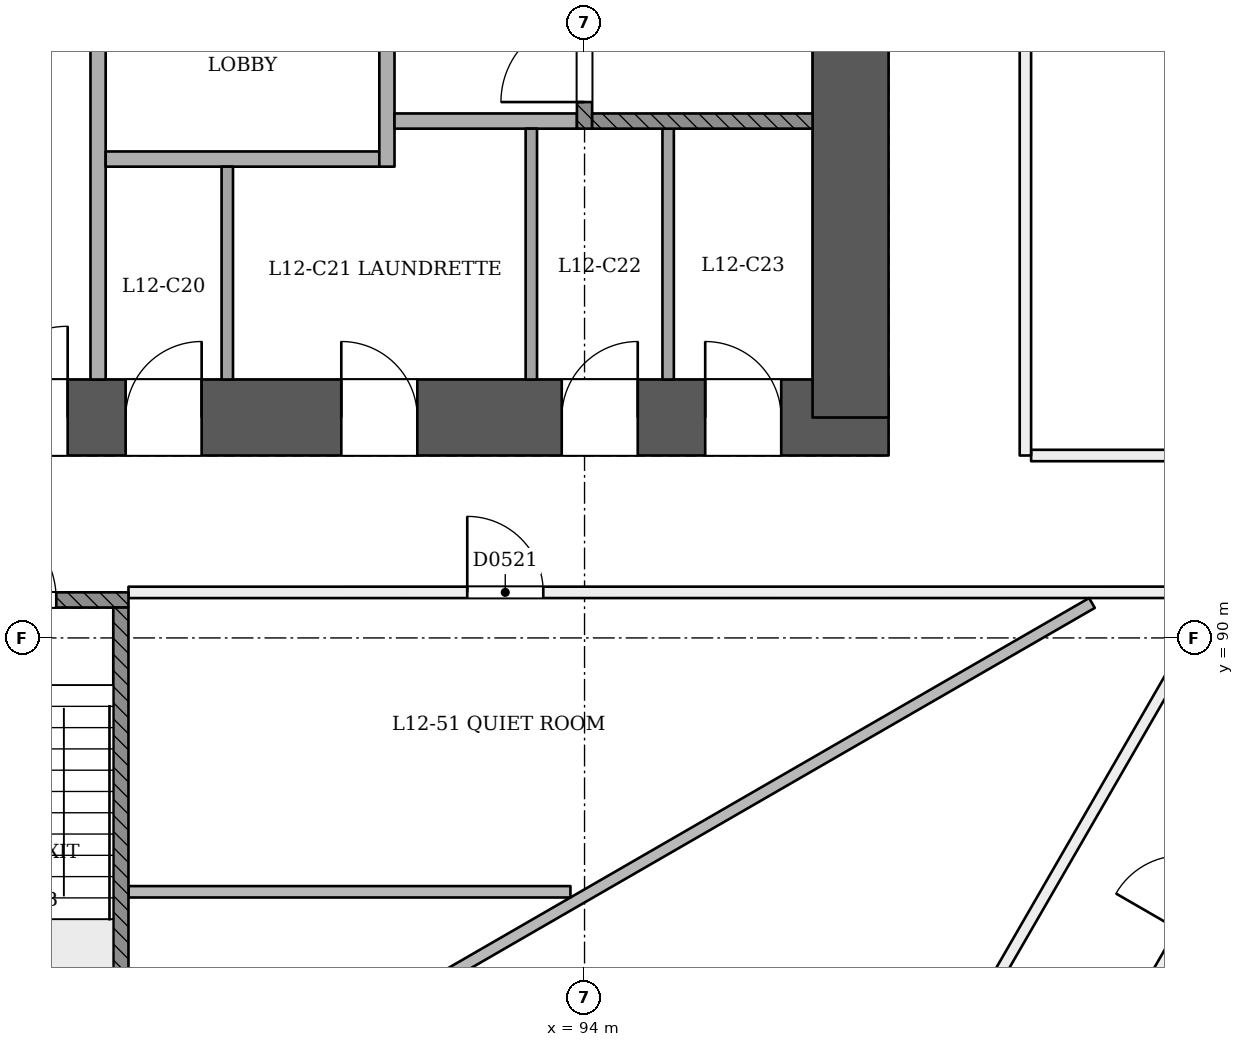
"""IFC4 building model, lengths in metres.
Left out: names, types, materials, properties, quantities, classifications, styles, units other than length and angle.
Written with IfcOpenShell. Run it as: python <this file> out.ifc"""

import sys

from ifc_helpers import new_model, si_unit, direction, frame, frame_2d, origin, place, context, subcontext, project, spatial, rectangle, extrude, element, fill, save


model = new_model("IFC4")
c1 = context("Model", 3, precision=1e-05, world=origin(), true_north=direction((0.0, 1.0)))
c2 = subcontext(c1, "Body", "Model", "MODEL_VIEW")
j1 = project(units=[si_unit("LENGTHUNIT", "METRE"), si_unit("PLANEANGLEUNIT", "RADIAN")], contexts=[c1])
p1 = place(None, origin())
s1 = spatial("IfcSite", under=j1, at=p1, CompositionType="ELEMENT")
p2 = place(p1, origin())
s2 = spatial("IfcBuilding", under=s1, at=p2, CompositionType="ELEMENT")
p3 = place(p2, frame((0.0, 0.0, 52.2)))
s3 = spatial("IfcBuildingStorey", under=s2, at=p3, CompositionType="ELEMENT", Elevation=52.2)
p4 = place(p3, frame((72.5, 92.9, 0.0), z_axis=(0.0, 0.0, 1.0), x_axis=(1.0, 0.0, 0.0)))
e1 = element("IfcWall", 1, at=p4, inside=s3, PredefinedType="SHEAR", context=c2, shape_type="SweptSolid", body=[
    extrude(rectangle(XDim=25.5, YDim=1.0, at=frame_2d((12.75, 0.0))), origin(), (0.0, 0.0, 1.0), 3.6),
])
p5 = place(p4, frame((1.3, 0.0, 0.0)))
e2 = element("IfcOpeningElement", 2, at=p5, cuts=e1, PredefinedType="OPENING", context=c2, shape_type="SweptSolid", body=[
    extrude(rectangle(XDim=1.2, YDim=2.1, at=frame_2d((0.6, 1.05))), frame((0.0, 0.51, 0.0), z_axis=(0.0, -1.0, 0.0), x_axis=(1.0, 0.0, 0.0)), (0.0, 0.0, 1.0), 1.021),
])
p6 = place(p4, frame((3.5, 0.0, 0.0)))
e3 = element("IfcOpeningElement", 3, at=p6, cuts=e1, PredefinedType="OPENING", context=c2, shape_type="SweptSolid", body=[
    extrude(rectangle(XDim=1.2, YDim=2.1, at=frame_2d((0.6, 1.05))), frame((0.0, 0.51, 0.0), z_axis=(0.0, -1.0, 0.0), x_axis=(1.0, 0.0, 0.0)), (0.0, 0.0, 1.0), 1.021),
])
p7 = place(p4, frame((13.5, 0.0, 0.0)))
e4 = element("IfcOpeningElement", 4, at=p7, cuts=e1, PredefinedType="OPENING", context=c2, shape_type="SweptSolid", body=[
    extrude(rectangle(XDim=1.2, YDim=2.1, at=frame_2d((0.6, 1.05))), frame((0.0, 0.51, 0.0), z_axis=(0.0, -1.0, 0.0), x_axis=(1.0, 0.0, 0.0)), (0.0, 0.0, 1.0), 1.021),
])
p8 = place(p4, frame((15.462, 0.0, 0.0)))
e5 = element("IfcOpeningElement", 5, at=p8, cuts=e1, PredefinedType="OPENING", context=c2, shape_type="SweptSolid", body=[
    extrude(rectangle(XDim=1.0, YDim=2.1, at=frame_2d((0.5, 1.05))), frame((0.0, 0.51, 0.0), z_axis=(0.0, -1.0, 0.0), x_axis=(1.0, 0.0, 0.0)), (0.0, 0.0, 1.0), 1.021),
])
p9 = place(p4, frame((18.3, 0.0, 0.0)))
e6 = element("IfcOpeningElement", 6, at=p9, cuts=e1, PredefinedType="OPENING", context=c2, shape_type="SweptSolid", body=[
    extrude(rectangle(XDim=1.0, YDim=2.1, at=frame_2d((0.5, 1.05))), frame((0.0, 0.51, 0.0), z_axis=(0.0, -1.0, 0.0), x_axis=(1.0, 0.0, 0.0)), (0.0, 0.0, 1.0), 1.021),
])
p10 = place(p4, frame((21.2, 0.0, 0.0)))
e7 = element("IfcOpeningElement", 7, at=p10, cuts=e1, PredefinedType="OPENING", context=c2, shape_type="SweptSolid", body=[
    extrude(rectangle(XDim=1.0, YDim=2.1, at=frame_2d((0.5, 1.05))), frame((0.0, 0.51, 0.0), z_axis=(0.0, -1.0, 0.0), x_axis=(1.0, 0.0, 0.0)), (0.0, 0.0, 1.0), 1.021),
])
p11 = place(p4, frame((23.087, 0.0, 0.0)))
e8 = element("IfcOpeningElement", 8, at=p11, cuts=e1, PredefinedType="OPENING", context=c2, shape_type="SweptSolid", body=[
    extrude(rectangle(XDim=1.0, YDim=2.1, at=frame_2d((0.5, 1.05))), frame((0.0, 0.51, 0.0), z_axis=(0.0, -1.0, 0.0), x_axis=(1.0, 0.0, 0.0)), (0.0, 0.0, 1.0), 1.021),
])
p12 = place(p3, frame((97.5, 92.9, 0.0), z_axis=(0.0, 0.0, 1.0), x_axis=(0.0, 1.0, 0.0)))
e9 = element("IfcWall", 9, at=p12, inside=s3, PredefinedType="SHEAR", context=c2, shape_type="SweptSolid", body=[
    extrude(rectangle(XDim=11.5, YDim=1.0, at=frame_2d((5.75, 0.0))), origin(), (0.0, 0.0, 1.0), 3.6),
])
p13 = place(p3, frame((86.05, 58.757, 0.0), z_axis=(0.0, 0.0, 1.0), x_axis=(0.499999296855, 0.866025809745, 0.0)))
e10 = element("IfcWall", 10, at=p13, inside=s3, PredefinedType="PARTITIONING", context=c2, shape_type="SweptSolid", body=[
    extrude(rectangle(XDim=43.792, YDim=0.15, at=frame_2d((21.896, 0.0))), origin(), (0.0, 0.0, 1.0), 2.7),
])
p14 = place(p13, frame((3.598, 0.0, 0.0)))
e11 = element("IfcOpeningElement", 11, at=p14, cuts=e10, PredefinedType="OPENING", context=c2, shape_type="SweptSolid", body=[
    extrude(rectangle(XDim=1.2, YDim=2.1, at=frame_2d((0.6, 1.05))), frame((0.0, 0.085, 0.0), z_axis=(0.0, -1.0, 0.0), x_axis=(1.0, 0.0, 0.0)), (0.0, 0.0, 1.0), 0.171),
])
p15 = place(p13, frame((11.176, 0.0, 0.0)))
e12 = element("IfcOpeningElement", 12, at=p15, cuts=e10, PredefinedType="OPENING", context=c2, shape_type="SweptSolid", body=[
    extrude(rectangle(XDim=1.0, YDim=2.1, at=frame_2d((0.5, 1.05))), frame((0.0, 0.085, 0.0), z_axis=(0.0, -1.0, 0.0), x_axis=(1.0, 0.0, 0.0)), (0.0, 0.0, 1.0), 0.171),
])
p16 = place(p13, frame((13.616, 0.0, 0.0)))
e13 = element("IfcOpeningElement", 13, at=p16, cuts=e10, PredefinedType="OPENING", context=c2, shape_type="SweptSolid", body=[
    extrude(rectangle(XDim=1.0, YDim=2.1, at=frame_2d((0.5, 1.05))), frame((0.0, 0.085, 0.0), z_axis=(0.0, -1.0, 0.0), x_axis=(1.0, 0.0, 0.0)), (0.0, 0.0, 1.0), 0.171),
])
p17 = place(p13, frame((20.176, 0.0, 0.0)))
e14 = element("IfcOpeningElement", 14, at=p17, cuts=e10, PredefinedType="OPENING", context=c2, shape_type="SweptSolid", body=[
    extrude(rectangle(XDim=1.0, YDim=2.1, at=frame_2d((0.5, 1.05))), frame((0.0, 0.085, 0.0), z_axis=(0.0, -1.0, 0.0), x_axis=(1.0, 0.0, 0.0)), (0.0, 0.0, 1.0), 0.171),
])
p18 = place(p13, frame((22.616, 0.0, 0.0)))
e15 = element("IfcOpeningElement", 15, at=p18, cuts=e10, PredefinedType="OPENING", context=c2, shape_type="SweptSolid", body=[
    extrude(rectangle(XDim=1.0, YDim=2.1, at=frame_2d((0.5, 1.05))), frame((0.0, 0.085, 0.0), z_axis=(0.0, -1.0, 0.0), x_axis=(1.0, 0.0, 0.0)), (0.0, 0.0, 1.0), 0.171),
])
p19 = place(p13, frame((29.176, 0.0, 0.0)))
e16 = element("IfcOpeningElement", 16, at=p19, cuts=e10, PredefinedType="OPENING", context=c2, shape_type="SweptSolid", body=[
    extrude(rectangle(XDim=1.0, YDim=2.1, at=frame_2d((0.5, 1.05))), frame((0.0, 0.085, 0.0), z_axis=(0.0, -1.0, 0.0), x_axis=(1.0, 0.0, 0.0)), (0.0, 0.0, 1.0), 0.171),
])
p20 = place(p13, frame((31.616, 0.0, 0.0)))
e17 = element("IfcOpeningElement", 17, at=p20, cuts=e10, PredefinedType="OPENING", context=c2, shape_type="SweptSolid", body=[
    extrude(rectangle(XDim=1.0, YDim=2.1, at=frame_2d((0.5, 1.05))), frame((0.0, 0.085, 0.0), z_axis=(0.0, -1.0, 0.0), x_axis=(1.0, 0.0, 0.0)), (0.0, 0.0, 1.0), 0.171),
])
p21 = place(p13, frame((38.176, 0.0, 0.0)))
e18 = element("IfcOpeningElement", 18, at=p21, cuts=e10, PredefinedType="OPENING", context=c2, shape_type="SweptSolid", body=[
    extrude(rectangle(XDim=1.0, YDim=2.1, at=frame_2d((0.5, 1.05))), frame((0.0, 0.085, 0.0), z_axis=(0.0, -1.0, 0.0), x_axis=(1.0, 0.0, 0.0)), (0.0, 0.0, 1.0), 0.171),
])
p22 = place(p13, frame((41.344, 0.0, 0.0)))
e19 = element("IfcOpeningElement", 19, at=p22, cuts=e10, PredefinedType="OPENING", context=c2, shape_type="SweptSolid", body=[
    extrude(rectangle(XDim=1.0, YDim=2.1, at=frame_2d((0.5, 1.05))), frame((0.0, 0.085, 0.0), z_axis=(0.0, -1.0, 0.0), x_axis=(1.0, 0.0, 0.0)), (0.0, 0.0, 1.0), 0.171),
])
p23 = place(p3, frame((103.395, 92.4, 0.0), z_axis=(0.0, 0.0, 1.0), x_axis=(-1.0, 0.0, 0.0)))
e20 = element("IfcWall", 20, at=p23, inside=s3, PredefinedType="PARTITIONING", context=c2, shape_type="SweptSolid", body=[
    extrude(rectangle(XDim=3.52, YDim=0.15, at=frame_2d((1.76, 0.0))), origin(), (0.0, 0.0, 1.0), 3.1),
])
p24 = place(p3, frame((99.8, 92.4, 0.0), z_axis=(0.0, 0.0, 1.0), x_axis=(0.0, 1.0, 0.0)))
e21 = element("IfcWall", 21, at=p24, inside=s3, PredefinedType="PARTITIONING", context=c2, shape_type="SweptSolid", body=[
    extrude(rectangle(XDim=11.5, YDim=0.15, at=frame_2d((5.75, 0.0))), origin(), (0.0, 0.0, 1.0), 2.6),
])
p25 = place(p24, frame((6.929, 0.0, 0.0)))
e22 = element("IfcOpeningElement", 22, at=p25, cuts=e21, PredefinedType="OPENING", context=c2, shape_type="SweptSolid", body=[
    extrude(rectangle(XDim=1.2, YDim=2.1, at=frame_2d((0.6, 1.05))), frame((0.0, 0.085, 0.0), z_axis=(0.0, -1.0, 0.0), x_axis=(1.0, 0.0, 0.0)), (0.0, 0.0, 1.0), 0.171),
])
p26 = place(p3, frame((102.355, 90.6, 0.0), z_axis=(0.0, 0.0, 1.0), x_axis=(-0.500000924128, -0.866024870238, 0.0)))
e23 = element("IfcWall", 23, at=p26, inside=s3, PredefinedType="PARTITIONING", context=c2, shape_type="SweptSolid", body=[
    extrude(rectangle(XDim=34.581, YDim=0.15, at=frame_2d((17.291, 0.0))), origin(), (0.0, 0.0, 1.0), 3.1),
])
p27 = place(p26, frame((9.118, 0.0, 0.0)))
e24 = element("IfcOpeningElement", 24, at=p27, cuts=e23, PredefinedType="OPENING", context=c2, shape_type="SweptSolid", body=[
    extrude(rectangle(XDim=1.2, YDim=2.1, at=frame_2d((0.6, 1.05))), frame((0.0, 0.085, 0.0), z_axis=(0.0, -1.0, 0.0), x_axis=(1.0, 0.0, 0.0)), (0.0, 0.0, 1.0), 0.171),
])
p28 = place(p3, frame((88.0, 90.599, 0.0), z_axis=(0.0, 0.0, 1.0), x_axis=(0.999999997644, 6.8649493e-05, 0.0)))
e25 = element("IfcWall", 25, at=p28, inside=s3, PredefinedType="PARTITIONING", context=c2, shape_type="SweptSolid", body=[
    extrude(rectangle(XDim=14.225, YDim=0.15, at=frame_2d((7.113, 0.0))), origin(), (0.0, 0.0, 1.0), 3.1),
])
p29 = place(p28, frame((4.457, 0.0, 0.0)))
e26 = element("IfcOpeningElement", 26, at=p29, cuts=e25, PredefinedType="OPENING", context=c2, shape_type="SweptSolid", body=[
    extrude(rectangle(XDim=1.0, YDim=2.1, at=frame_2d((0.5, 1.05))), frame((0.0, 0.085, 0.0), z_axis=(0.0, -1.0, 0.0), x_axis=(1.0, 0.0, 0.0)), (0.0, 0.0, 1.0), 0.171),
])
p30 = place(p3, frame((100.676, 90.46, 0.0), z_axis=(0.0, 0.0, 1.0), x_axis=(-0.866019571687, -0.500010101354, 0.0)))
e27 = element("IfcWall", 27, at=p30, inside=s3, PredefinedType="PARTITIONING", context=c2, shape_type="SweptSolid", body=[
    extrude(rectangle(XDim=13.641, YDim=0.15, at=frame_2d((6.82, 0.0))), origin(), (0.0, 0.0, 1.0), 3.1),
])
p31 = place(p3, frame((93.814, 86.66, 0.0), z_axis=(0.0, 0.0, 1.0), x_axis=(-1.0, 0.0, 0.0)))
e28 = element("IfcWall", 28, at=p31, inside=s3, PredefinedType="PARTITIONING", context=c2, shape_type="SweptSolid", body=[
    extrude(rectangle(XDim=5.814, YDim=0.15, at=frame_2d((2.907, 0.0))), origin(), (0.0, 0.0, 1.0), 3.1),
])
p32 = place(p3, frame((87.6, 93.4, 0.0), z_axis=(0.0, 0.0, 1.0), x_axis=(0.0, 1.0, 0.0)))
e29 = element("IfcWall", 29, at=p32, inside=s3, PredefinedType="PARTITIONING", context=c2, shape_type="SweptSolid", body=[
    extrude(rectangle(XDim=7.0, YDim=0.2, at=frame_2d((3.5, 0.0))), origin(), (0.0, 0.0, 1.0), 3.1),
])
p33 = place(p32, frame((4.45, 0.0, 0.0)))
e30 = element("IfcOpeningElement", 30, at=p33, cuts=e29, PredefinedType="OPENING", context=c2, shape_type="SweptSolid", body=[
    extrude(rectangle(XDim=1.1, YDim=2.1, at=frame_2d((0.55, 1.05))), frame((0.0, 0.11, 0.0), z_axis=(0.0, -1.0, 0.0), x_axis=(1.0, 0.0, 0.0)), (0.0, 0.0, 1.0), 0.221),
])
p34 = place(p3, frame((89.3, 93.4, 0.0), z_axis=(0.0, 0.0, 1.0), x_axis=(0.0, 1.0, 0.0)))
e31 = element("IfcWall", 31, at=p34, inside=s3, PredefinedType="PARTITIONING", context=c2, shape_type="SweptSolid", body=[
    extrude(rectangle(XDim=2.8, YDim=0.15, at=frame_2d((1.4, 0.0))), origin(), (0.0, 0.0, 1.0), 3.1),
])
for number, where, z_axis, x_axis in (
    (32, (93.3, 93.4, 0.0), (0.0, 0.0, 1.0), (0.0, 1.0, 0.0)),
    (33, (95.1, 93.4, 0.0), (0.0, 0.0, 1.0), (0.0, 1.0, 0.0)),
):
    element("IfcWall", number, at=place(p3, frame(where, z_axis=z_axis, x_axis=x_axis)), inside=s3, PredefinedType="PARTITIONING", context=c2, shape_type="SweptSolid", body=[
        extrude(rectangle(XDim=3.3, YDim=0.15, at=frame_2d((1.65, 0.0))), origin(), (0.0, 0.0, 1.0), 3.1),
    ])
p35 = place(p3, frame((87.7, 96.3, 0.0), z_axis=(0.0, 0.0, 1.0), x_axis=(1.0, 0.0, 0.0)))
e34 = element("IfcWall", 34, at=p35, inside=s3, PredefinedType="PARTITIONING", context=c2, shape_type="SweptSolid", body=[
    extrude(rectangle(XDim=3.6, YDim=0.2, at=frame_2d((1.8, 0.0))), origin(), (0.0, 0.0, 1.0), 3.1),
])
p36 = place(p3, frame((91.4, 96.2, 0.0), z_axis=(0.0, 0.0, 1.0), x_axis=(0.0, 1.0, 0.0)))
e35 = element("IfcWall", 35, at=p36, inside=s3, PredefinedType="PARTITIONING", context=c2, shape_type="SweptSolid", body=[
    extrude(rectangle(XDim=4.2, YDim=0.2, at=frame_2d((2.1, 0.0))), origin(), (0.0, 0.0, 1.0), 3.1),
])
p37 = place(p36, frame((2.45, 0.0, 0.0)))
e36 = element("IfcOpeningElement", 36, at=p37, cuts=e35, PredefinedType="OPENING", context=c2, shape_type="SweptSolid", body=[
    extrude(rectangle(XDim=1.1, YDim=2.1, at=frame_2d((0.55, 1.05))), frame((0.0, 0.11, 0.0), z_axis=(0.0, -1.0, 0.0), x_axis=(1.0, 0.0, 0.0)), (0.0, 0.0, 1.0), 0.221),
])
p38 = place(p3, frame((91.5, 96.8, 0.0), z_axis=(0.0, 0.0, 1.0), x_axis=(1.0, 0.0, 0.0)))
e37 = element("IfcWall", 37, at=p38, inside=s3, PredefinedType="PARTITIONING", context=c2, shape_type="SweptSolid", body=[
    extrude(rectangle(XDim=2.4, YDim=0.2, at=frame_2d((1.2, 0.0))), origin(), (0.0, 0.0, 1.0), 3.1),
])
p39 = place(p3, frame((94.0, 96.7, 0.0), z_axis=(0.0, 0.0, 1.0), x_axis=(0.0, 1.0, 0.0)))
e38 = element("IfcWall", 38, at=p39, inside=s3, PredefinedType="SOLIDWALL", context=c2, shape_type="SweptSolid", body=[
    extrude(rectangle(XDim=3.7, YDim=0.2, at=frame_2d((1.85, 0.0))), origin(), (0.0, 0.0, 1.0), 3.1),
])
p40 = place(p39, frame((0.35, 0.0, 0.0)))
e39 = element("IfcOpeningElement", 39, at=p40, cuts=e38, PredefinedType="OPENING", context=c2, shape_type="SweptSolid", body=[
    extrude(rectangle(XDim=1.1, YDim=2.1, at=frame_2d((0.55, 1.05))), frame((0.0, 0.11, 0.0), z_axis=(0.0, -1.0, 0.0), x_axis=(1.0, 0.0, 0.0)), (0.0, 0.0, 1.0), 0.221),
])
p41 = place(p3, frame((94.1, 96.8, 0.0), z_axis=(0.0, 0.0, 1.0), x_axis=(1.0, 0.0, 0.0)))
e40 = element("IfcWall", 40, at=p41, inside=s3, PredefinedType="SOLIDWALL", context=c2, shape_type="SweptSolid", body=[
    extrude(rectangle(XDim=2.9, YDim=0.2, at=frame_2d((1.45, 0.0))), origin(), (0.0, 0.0, 1.0), 3.1),
])
p42 = place(p3, frame((82.0, 90.5, 0.0), z_axis=(0.0, 0.0, 1.0), x_axis=(1.0, 0.0, 0.0)))
e41 = element("IfcWall", 41, at=p42, inside=s3, PredefinedType="SOLIDWALL", context=c2, shape_type="SweptSolid", body=[
    extrude(rectangle(XDim=6.0, YDim=0.2, at=frame_2d((3.0, 0.0))), origin(), (0.0, 0.0, 1.0), 3.1),
])
p43 = place(p42, frame((0.95, 0.0, 0.0)))
e42 = element("IfcOpeningElement", 42, at=p43, cuts=e41, PredefinedType="OPENING", context=c2, shape_type="SweptSolid", body=[
    extrude(rectangle(XDim=1.2, YDim=2.1, at=frame_2d((0.6, 1.05))), frame((0.0, 0.11, 0.0), z_axis=(0.0, -1.0, 0.0), x_axis=(1.0, 0.0, 0.0)), (0.0, 0.0, 1.0), 0.221),
])
p44 = place(p42, frame((3.85, 0.0, 0.0)))
e43 = element("IfcOpeningElement", 43, at=p44, cuts=e41, PredefinedType="OPENING", context=c2, shape_type="SweptSolid", body=[
    extrude(rectangle(XDim=1.2, YDim=2.1, at=frame_2d((0.6, 1.05))), frame((0.0, 0.11, 0.0), z_axis=(0.0, -1.0, 0.0), x_axis=(1.0, 0.0, 0.0)), (0.0, 0.0, 1.0), 0.221),
])
p45 = place(p3, frame((87.9, 83.6, 0.0), z_axis=(0.0, 0.0, 1.0), x_axis=(0.0, 1.0, 0.0)))
e44 = element("IfcWall", 44, at=p45, inside=s3, PredefinedType="SOLIDWALL", context=c2, shape_type="SweptSolid", body=[
    extrude(rectangle(XDim=6.8, YDim=0.2, at=frame_2d((3.4, 0.0))), origin(), (0.0, 0.0, 1.0), 3.1),
])
p46 = place(p29, origin())
e45 = element("IfcDoor", 45, at=p46, inside=s3, OperationType="SINGLE_SWING_LEFT", PredefinedType="NOTDEFINED", context=c2, shape_type="SweptSolid", body=[
    extrude(rectangle(XDim=1.0, YDim=2.1, at=frame_2d((0.5, 1.05))), frame((0.0, 0.025, 0.0), z_axis=(0.0, -1.0, 0.0), x_axis=(1.0, 0.0, 0.0)), (0.0, 0.0, 1.0), 0.05),
])
fill(e26, e45)
p47 = place(p40, origin())
e46 = element("IfcDoor", 46, at=p47, inside=s3, OperationType="SINGLE_SWING_LEFT", PredefinedType="NOTDEFINED", context=c2, shape_type="SweptSolid", body=[
    extrude(rectangle(XDim=1.1, YDim=2.1, at=frame_2d((0.55, 1.05))), frame((0.0, 0.025, 0.0), z_axis=(0.0, -1.0, 0.0), x_axis=(1.0, 0.0, 0.0)), (0.0, 0.0, 1.0), 0.05),
])
fill(e39, e46)
p48 = place(p7, origin())
e47 = element("IfcDoor", 47, at=p48, inside=s3, OperationType="SINGLE_SWING_RIGHT", PredefinedType="NOTDEFINED", context=c2, shape_type="SweptSolid", body=[
    extrude(rectangle(XDim=1.2, YDim=2.1, at=frame_2d((0.6, 1.05))), frame((0.0, 0.025, 0.0), z_axis=(0.0, -1.0, 0.0), x_axis=(1.0, 0.0, 0.0)), (0.0, 0.0, 1.0), 0.05),
])
fill(e4, e47)
p49 = place(p8, origin())
e48 = element("IfcDoor", 48, at=p49, inside=s3, OperationType="SINGLE_SWING_RIGHT", PredefinedType="NOTDEFINED", context=c2, shape_type="SweptSolid", body=[
    extrude(rectangle(XDim=1.0, YDim=2.1, at=frame_2d((0.5, 1.05))), frame((0.0, 0.025, 0.0), z_axis=(0.0, -1.0, 0.0), x_axis=(1.0, 0.0, 0.0)), (0.0, 0.0, 1.0), 0.05),
])
fill(e5, e48)
p50 = place(p9, origin())
e49 = element("IfcDoor", 49, at=p50, inside=s3, OperationType="SINGLE_SWING_LEFT", PredefinedType="NOTDEFINED", context=c2, shape_type="SweptSolid", body=[
    extrude(rectangle(XDim=1.0, YDim=2.1, at=frame_2d((0.5, 1.05))), frame((0.0, 0.025, 0.0), z_axis=(0.0, -1.0, 0.0), x_axis=(1.0, 0.0, 0.0)), (0.0, 0.0, 1.0), 0.05),
])
fill(e6, e49)
p51 = place(p10, origin())
e50 = element("IfcDoor", 50, at=p51, inside=s3, OperationType="SINGLE_SWING_RIGHT", PredefinedType="NOTDEFINED", context=c2, shape_type="SweptSolid", body=[
    extrude(rectangle(XDim=1.0, YDim=2.1, at=frame_2d((0.5, 1.05))), frame((0.0, 0.025, 0.0), z_axis=(0.0, -1.0, 0.0), x_axis=(1.0, 0.0, 0.0)), (0.0, 0.0, 1.0), 0.05),
])
fill(e7, e50)
p52 = place(p11, origin())
e51 = element("IfcDoor", 51, at=p52, inside=s3, OperationType="SINGLE_SWING_LEFT", PredefinedType="NOTDEFINED", context=c2, shape_type="SweptSolid", body=[
    extrude(rectangle(XDim=1.0, YDim=2.1, at=frame_2d((0.5, 1.05))), frame((0.0, 0.025, 0.0), z_axis=(0.0, -1.0, 0.0), x_axis=(1.0, 0.0, 0.0)), (0.0, 0.0, 1.0), 0.05),
])
fill(e8, e51)
p53 = place(p44, origin())
e52 = element("IfcDoor", 52, at=p53, inside=s3, OperationType="SINGLE_SWING_LEFT", PredefinedType="NOTDEFINED", context=c2, shape_type="SweptSolid", body=[
    extrude(rectangle(XDim=1.2, YDim=2.1, at=frame_2d((0.6, 1.05))), frame((0.0, 0.025, 0.0), z_axis=(0.0, -1.0, 0.0), x_axis=(1.0, 0.0, 0.0)), (0.0, 0.0, 1.0), 0.05),
])
fill(e43, e52)
save(model, sys.argv[1])
